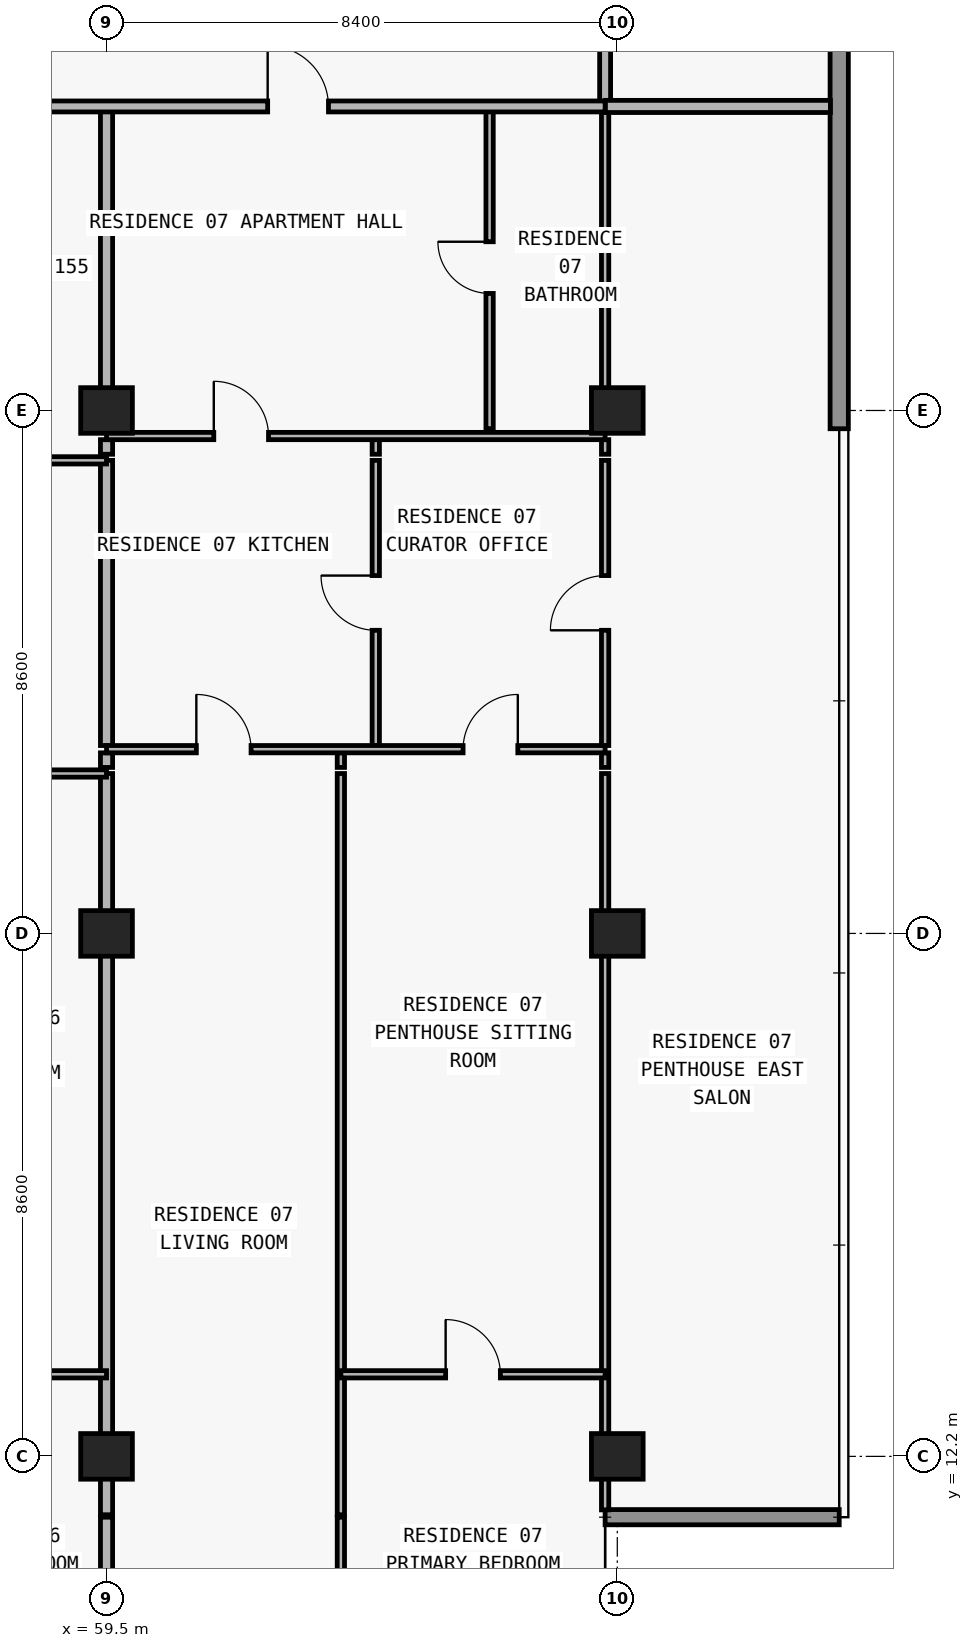
"""IFC4 building model, lengths in metres.
Left out: names, types, materials, properties, quantities, classifications, styles, units other than length and angle.
Written with IfcOpenShell. Run it as: python <this file> out.ifc"""

import sys

from ifc_helpers import new_model, si_unit, direction, frame, frame_2d, origin, origin_2d, place, context, subcontext, project, spatial, rectangle, extrude, element, fill, save


model = new_model("IFC4")
c1 = context("Model", 3, precision=1e-05, world=origin(), true_north=direction((0.0, 1.0)))
c2 = subcontext(c1, "Body", "Model", "MODEL_VIEW")
j1 = project(units=[si_unit("LENGTHUNIT", "METRE"), si_unit("PLANEANGLEUNIT", "RADIAN")], contexts=[c1])
p1 = place(None, origin())
s1 = spatial("IfcSite", under=j1, at=p1, CompositionType="ELEMENT")
p2 = place(p1, origin())
s2 = spatial("IfcBuilding", under=s1, at=p2, CompositionType="ELEMENT")
p3 = place(p2, frame((0.0, 0.0, 218.1)))
s3 = spatial("IfcBuildingStorey", under=s2, at=p3, CompositionType="ELEMENT", Elevation=218.1)
for number, where, z_axis, x_axis in (
    (1, (59.5, 12.2, 0.0), (0.0, 0.0, 1.0), (1.0, 0.0, 0.0)),
    (2, (67.9, 12.2, 0.0), (0.0, 0.0, 1.0), (1.0, 0.0, 0.0)),
    (3, (59.5, 20.8, 0.0), (0.0, 0.0, 1.0), (1.0, 0.0, 0.0)),
    (4, (67.9, 20.8, 0.0), (0.0, 0.0, 1.0), (1.0, 0.0, 0.0)),
    (5, (59.5, 29.4, 0.0), (0.0, 0.0, 1.0), (1.0, 0.0, 0.0)),
    (6, (67.9, 29.4, 0.0), (0.0, 0.0, 1.0), (1.0, 0.0, 0.0)),
):
    element("IfcColumn", number, at=place(p3, frame(where, z_axis=z_axis, x_axis=x_axis)), inside=s3, PredefinedType="COLUMN", context=c2, shape_type="SweptSolid", body=[
        extrude(rectangle(XDim=0.85, YDim=0.75, at=origin_2d()), origin(), (0.0, 0.0, 1.0), 3.0),
    ])
p4 = place(p3, frame((67.7, 11.2, 0.0), z_axis=(0.0, 0.0, 1.0), x_axis=(1.0, 0.0, 0.0)))
e7 = element("IfcWall", 7, at=p4, inside=s3, PredefinedType="ELEMENTEDWALL", context=c2, shape_type="SweptSolid", body=[
    extrude(rectangle(XDim=3.85, YDim=0.25, at=frame_2d((1.925, 0.0))), origin(), (0.0, 0.0, 1.0), 3.0),
])
p5 = place(p3, frame((71.55, 47.0, 0.0), z_axis=(0.0, 0.0, 1.0), x_axis=(0.0, -1.0, 0.0)))
e8 = element("IfcWall", 8, at=p5, inside=s3, PredefinedType="STANDARD", context=c2, shape_type="SweptSolid", body=[
    extrude(rectangle(XDim=17.9, YDim=0.3, at=frame_2d((8.95, 0.0))), origin(), (0.0, 0.0, 1.0), 3.0),
])
p6 = place(p3, frame((59.5, 7.895, 0.0), z_axis=(0.0, 0.0, 1.0), x_axis=(0.0, 1.0, 0.0)))
e9 = element("IfcWall", 9, at=p6, inside=s3, PredefinedType="PARTITIONING", context=c2, shape_type="SweptSolid", body=[
    extrude(rectangle(XDim=3.305, YDim=0.2, at=frame_2d((1.652, 0.0))), origin(), (0.0, 0.0, 1.0), 3.0),
])
p7 = place(p3, frame((59.5, 11.24, 0.0), z_axis=(0.0, 0.0, 1.0), x_axis=(0.0, 1.0, 0.0)))
e10 = element("IfcWall", 10, at=p7, inside=s3, PredefinedType="PARTITIONING", context=c2, shape_type="SweptSolid", body=[
    extrude(rectangle(XDim=12.19, YDim=0.2, at=frame_2d((6.095, 0.0))), origin(), (0.0, 0.0, 1.0), 2.213),
])
p8 = place(p3, frame((59.5, 23.53, 0.0), z_axis=(0.0, 0.0, 1.0), x_axis=(0.0, 1.0, 0.0)))
e11 = element("IfcWall", 11, at=p8, inside=s3, PredefinedType="PARTITIONING", context=c2, shape_type="SweptSolid", body=[
    extrude(rectangle(XDim=0.24, YDim=0.2, at=frame_2d((0.12, 0.0))), origin(), (0.0, 0.0, 1.0), 2.213),
])
p9 = place(p3, frame((59.5, 23.89, 0.0), z_axis=(0.0, 0.0, 1.0), x_axis=(0.0, 1.0, 0.0)))
e12 = element("IfcWall", 12, at=p9, inside=s3, PredefinedType="PARTITIONING", context=c2, shape_type="SweptSolid", body=[
    extrude(rectangle(XDim=4.69, YDim=0.2, at=frame_2d((2.345, 0.0))), origin(), (0.0, 0.0, 1.0), 2.213),
])
p10 = place(p3, frame((59.5, 28.68, 0.0), z_axis=(0.0, 0.0, 1.0), x_axis=(0.0, 1.0, 0.0)))
e13 = element("IfcWall", 13, at=p10, inside=s3, PredefinedType="PARTITIONING", context=c2, shape_type="SweptSolid", body=[
    extrude(rectangle(XDim=0.24, YDim=0.2, at=frame_2d((0.12, 0.0))), origin(), (0.0, 0.0, 1.0), 2.213),
])
p11 = place(p3, frame((59.5, 29.1, 0.0), z_axis=(0.0, 0.0, 1.0), x_axis=(0.0, 1.0, 0.0)))
e14 = element("IfcWall", 14, at=p11, inside=s3, PredefinedType="PARTITIONING", context=c2, shape_type="SweptSolid", body=[
    extrude(rectangle(XDim=5.3, YDim=0.2, at=frame_2d((2.65, 0.0))), origin(), (0.0, 0.0, 1.0), 2.213),
])
p12 = place(p3, frame((63.354, 7.895, 0.0), z_axis=(0.0, 0.0, 1.0), x_axis=(0.0, 1.0, 0.0)))
e15 = element("IfcWall", 15, at=p12, inside=s3, PredefinedType="PARTITIONING", context=c2, shape_type="SweptSolid", body=[
    extrude(rectangle(XDim=3.305, YDim=0.12, at=frame_2d((1.652, 0.0))), origin(), (0.0, 0.0, 1.0), 3.0),
])
p13 = place(p3, frame((63.354, 11.24, 0.0), z_axis=(0.0, 0.0, 1.0), x_axis=(0.0, 1.0, 0.0)))
e16 = element("IfcWall", 16, at=p13, inside=s3, PredefinedType="PARTITIONING", context=c2, shape_type="SweptSolid", body=[
    extrude(rectangle(XDim=12.19, YDim=0.12, at=frame_2d((6.095, 0.0))), origin(), (0.0, 0.0, 1.0), 3.0),
])
p14 = place(p3, frame((63.354, 23.53, 0.0), z_axis=(0.0, 0.0, 1.0), x_axis=(0.0, 1.0, 0.0)))
e17 = element("IfcWall", 17, at=p14, inside=s3, PredefinedType="PARTITIONING", context=c2, shape_type="SweptSolid", body=[
    extrude(rectangle(XDim=0.24, YDim=0.12, at=frame_2d((0.12, 0.0))), origin(), (0.0, 0.0, 1.0), 3.0),
])
p15 = place(p3, frame((63.928, 23.89, 0.0), z_axis=(0.0, 0.0, 1.0), x_axis=(0.0, 1.0, 0.0)))
e18 = element("IfcWall", 18, at=p15, inside=s3, PredefinedType="PARTITIONING", context=c2, shape_type="SweptSolid", body=[
    extrude(rectangle(XDim=4.69, YDim=0.12, at=frame_2d((2.345, 0.0))), origin(), (0.0, 0.0, 1.0), 2.449),
])
p16 = place(p15, frame((1.895, 0.0, 0.0)))
e19 = element("IfcOpeningElement", 19, at=p16, cuts=e18, PredefinedType="OPENING", context=c2, shape_type="SweptSolid", body=[
    extrude(rectangle(XDim=0.9, YDim=2.15, at=frame_2d((0.45, 1.075))), frame((0.0, 0.07, 0.0), z_axis=(0.0, -1.0, 0.0), x_axis=(1.0, 0.0, 0.0)), (0.0, 0.0, 1.0), 0.14),
])
p17 = place(p3, frame((63.928, 28.68, 0.0), z_axis=(0.0, 0.0, 1.0), x_axis=(0.0, 1.0, 0.0)))
e20 = element("IfcWall", 20, at=p17, inside=s3, PredefinedType="PARTITIONING", context=c2, shape_type="SweptSolid", body=[
    extrude(rectangle(XDim=0.24, YDim=0.12, at=frame_2d((0.12, 0.0))), origin(), (0.0, 0.0, 1.0), 2.449),
])
p18 = place(p3, frame((65.8, 29.1, 0.0), z_axis=(0.0, 0.0, 1.0), x_axis=(0.0, 1.0, 0.0)))
e21 = element("IfcWall", 21, at=p18, inside=s3, PredefinedType="PARTITIONING", context=c2, shape_type="SweptSolid", body=[
    extrude(rectangle(XDim=5.3, YDim=0.12, at=frame_2d((2.65, 0.0))), origin(), (0.0, 0.0, 1.0), 2.675),
])
p19 = place(p18, frame((2.225, 0.0, 0.0)))
e22 = element("IfcOpeningElement", 22, at=p19, cuts=e21, PredefinedType="OPENING", context=c2, shape_type="SweptSolid", body=[
    extrude(rectangle(XDim=0.85, YDim=2.1, at=frame_2d((0.425, 1.05))), frame((0.0, 0.07, 0.0), z_axis=(0.0, -1.0, 0.0), x_axis=(1.0, 0.0, 0.0)), (0.0, 0.0, 1.0), 0.14),
])
p20 = place(p3, frame((67.7, 11.32, 0.0), z_axis=(0.0, 0.0, 1.0), x_axis=(0.0, 1.0, 0.0)))
e23 = element("IfcWall", 23, at=p20, inside=s3, PredefinedType="PARTITIONING", context=c2, shape_type="SweptSolid", body=[
    extrude(rectangle(XDim=12.11, YDim=0.12, at=frame_2d((6.055, 0.0))), origin(), (0.0, 0.0, 1.0), 2.213),
])
p21 = place(p3, frame((67.7, 23.53, 0.0), z_axis=(0.0, 0.0, 1.0), x_axis=(0.0, 1.0, 0.0)))
e24 = element("IfcWall", 24, at=p21, inside=s3, PredefinedType="PARTITIONING", context=c2, shape_type="SweptSolid", body=[
    extrude(rectangle(XDim=0.24, YDim=0.12, at=frame_2d((0.12, 0.0))), origin(), (0.0, 0.0, 1.0), 2.213),
])
p22 = place(p3, frame((67.7, 23.89, 0.0), z_axis=(0.0, 0.0, 1.0), x_axis=(0.0, 1.0, 0.0)))
e25 = element("IfcWall", 25, at=p22, inside=s3, PredefinedType="PARTITIONING", context=c2, shape_type="SweptSolid", body=[
    extrude(rectangle(XDim=4.69, YDim=0.12, at=frame_2d((2.345, 0.0))), origin(), (0.0, 0.0, 1.0), 2.213),
])
p23 = place(p22, frame((1.895, 0.0, 0.0)))
e26 = element("IfcOpeningElement", 26, at=p23, cuts=e25, PredefinedType="OPENING", context=c2, shape_type="SweptSolid", body=[
    extrude(rectangle(XDim=0.9, YDim=2.15, at=frame_2d((0.45, 1.075))), frame((0.0, 0.07, 0.0), z_axis=(0.0, -1.0, 0.0), x_axis=(1.0, 0.0, 0.0)), (0.0, 0.0, 1.0), 0.14),
])
p24 = place(p3, frame((67.7, 28.68, 0.0), z_axis=(0.0, 0.0, 1.0), x_axis=(0.0, 1.0, 0.0)))
e27 = element("IfcWall", 27, at=p24, inside=s3, PredefinedType="PARTITIONING", context=c2, shape_type="SweptSolid", body=[
    extrude(rectangle(XDim=0.24, YDim=0.12, at=frame_2d((0.12, 0.0))), origin(), (0.0, 0.0, 1.0), 2.213),
])
p25 = place(p3, frame((67.7, 29.1, 0.0), z_axis=(0.0, 0.0, 1.0), x_axis=(0.0, 1.0, 0.0)))
e28 = element("IfcWall", 28, at=p25, inside=s3, PredefinedType="PARTITIONING", context=c2, shape_type="SweptSolid", body=[
    extrude(rectangle(XDim=5.3, YDim=0.12, at=frame_2d((2.65, 0.0))), origin(), (0.0, 0.0, 1.0), 2.213),
])
p26 = place(p3, frame((67.7, 34.405, 0.0), z_axis=(0.0, 0.0, 1.0), x_axis=(0.0, 1.0, 0.0)))
e29 = element("IfcWall", 29, at=p26, inside=s3, PredefinedType="PARTITIONING", context=c2, shape_type="SweptSolid", body=[
    extrude(rectangle(XDim=2.595, YDim=0.18, at=frame_2d((1.297, 0.0))), origin(), (0.0, 0.0, 1.0), 2.213),
])
p27 = place(p3, frame((55.72, 13.55, 0.0), z_axis=(0.0, 0.0, 1.0), x_axis=(1.0, 0.0, 0.0)))
e30 = element("IfcWall", 30, at=p27, inside=s3, PredefinedType="PARTITIONING", context=c2, shape_type="SweptSolid", body=[
    extrude(rectangle(XDim=3.78, YDim=0.12, at=frame_2d((1.89, 0.0))), origin(), (0.0, 0.0, 1.0), 3.0),
])
p28 = place(p27, frame((1.44, 0.0, 0.0)))
e31 = element("IfcOpeningElement", 31, at=p28, cuts=e30, PredefinedType="OPENING", context=c2, shape_type="SweptSolid", body=[
    extrude(rectangle(XDim=0.9, YDim=2.15, at=frame_2d((0.45, 1.075))), frame((0.0, 0.07, 0.0), z_axis=(0.0, -1.0, 0.0), x_axis=(1.0, 0.0, 0.0)), (0.0, 0.0, 1.0), 0.14),
])
p29 = place(p3, frame((63.354, 13.55, 0.0), z_axis=(0.0, 0.0, 1.0), x_axis=(1.0, 0.0, 0.0)))
e32 = element("IfcWall", 32, at=p29, inside=s3, PredefinedType="PARTITIONING", context=c2, shape_type="SweptSolid", body=[
    extrude(rectangle(XDim=4.346, YDim=0.12, at=frame_2d((2.173, 0.0))), origin(), (0.0, 0.0, 1.0), 3.0),
])
p30 = place(p29, frame((1.723, 0.0, 0.0)))
e33 = element("IfcOpeningElement", 33, at=p30, cuts=e32, PredefinedType="OPENING", context=c2, shape_type="SweptSolid", body=[
    extrude(rectangle(XDim=0.9, YDim=2.15, at=frame_2d((0.45, 1.075))), frame((0.0, 0.07, 0.0), z_axis=(0.0, -1.0, 0.0), x_axis=(1.0, 0.0, 0.0)), (0.0, 0.0, 1.0), 0.14),
])
p31 = place(p3, frame((51.32, 23.43, 0.0), z_axis=(0.0, 0.0, 1.0), x_axis=(1.0, 0.0, 0.0)))
e34 = element("IfcWall", 34, at=p31, inside=s3, PredefinedType="PARTITIONING", context=c2, shape_type="SweptSolid", body=[
    extrude(rectangle(XDim=8.18, YDim=0.12, at=frame_2d((4.09, 0.0))), origin(), (0.0, 0.0, 1.0), 3.0),
])
p32 = place(p31, frame((1.583, 0.0, 0.0)))
e35 = element("IfcOpeningElement", 35, at=p32, cuts=e34, PredefinedType="OPENING", context=c2, shape_type="SweptSolid", body=[
    extrude(rectangle(XDim=0.9, YDim=2.15, at=frame_2d((0.45, 1.075))), frame((0.0, 0.07, 0.0), z_axis=(0.0, -1.0, 0.0), x_axis=(1.0, 0.0, 0.0)), (0.0, 0.0, 1.0), 0.14),
])
p33 = place(p31, frame((5.84, 0.0, 0.0)))
e36 = element("IfcOpeningElement", 36, at=p33, cuts=e34, PredefinedType="OPENING", context=c2, shape_type="SweptSolid", body=[
    extrude(rectangle(XDim=0.9, YDim=2.15, at=frame_2d((0.45, 1.075))), frame((0.0, 0.07, 0.0), z_axis=(0.0, -1.0, 0.0), x_axis=(1.0, 0.0, 0.0)), (0.0, 0.0, 1.0), 0.14),
])
p34 = place(p3, frame((59.5, 23.83, 0.0), z_axis=(0.0, 0.0, 1.0), x_axis=(1.0, 0.0, 0.0)))
e37 = element("IfcWall", 37, at=p34, inside=s3, PredefinedType="PARTITIONING", context=c2, shape_type="SweptSolid", body=[
    extrude(rectangle(XDim=8.2, YDim=0.12, at=frame_2d((4.1, 0.0))), origin(), (0.0, 0.0, 1.0), 3.0),
])
p35 = place(p34, frame((1.477, 0.0, 0.0)))
e38 = element("IfcOpeningElement", 38, at=p35, cuts=e37, PredefinedType="OPENING", context=c2, shape_type="SweptSolid", body=[
    extrude(rectangle(XDim=0.9, YDim=2.15, at=frame_2d((0.45, 1.075))), frame((0.0, 0.07, 0.0), z_axis=(0.0, -1.0, 0.0), x_axis=(1.0, 0.0, 0.0)), (0.0, 0.0, 1.0), 0.14),
])
p36 = place(p34, frame((5.864, 0.0, 0.0)))
e39 = element("IfcOpeningElement", 39, at=p36, cuts=e37, PredefinedType="OPENING", context=c2, shape_type="SweptSolid", body=[
    extrude(rectangle(XDim=0.9, YDim=2.15, at=frame_2d((0.45, 1.075))), frame((0.0, 0.07, 0.0), z_axis=(0.0, -1.0, 0.0), x_axis=(1.0, 0.0, 0.0)), (0.0, 0.0, 1.0), 0.14),
])
p37 = place(p3, frame((51.32, 28.58, 0.0), z_axis=(0.0, 0.0, 1.0), x_axis=(1.0, 0.0, 0.0)))
e40 = element("IfcWall", 40, at=p37, inside=s3, PredefinedType="PARTITIONING", context=c2, shape_type="SweptSolid", body=[
    extrude(rectangle(XDim=8.18, YDim=0.12, at=frame_2d((4.09, 0.0))), origin(), (0.0, 0.0, 1.0), 3.0),
])
p38 = place(p37, frame((1.583, 0.0, 0.0)))
e41 = element("IfcOpeningElement", 41, at=p38, cuts=e40, PredefinedType="OPENING", context=c2, shape_type="SweptSolid", body=[
    extrude(rectangle(XDim=0.9, YDim=2.15, at=frame_2d((0.45, 1.075))), frame((0.0, 0.07, 0.0), z_axis=(0.0, -1.0, 0.0), x_axis=(1.0, 0.0, 0.0)), (0.0, 0.0, 1.0), 0.14),
])
p39 = place(p3, frame((59.5, 28.98, 0.0), z_axis=(0.0, 0.0, 1.0), x_axis=(1.0, 0.0, 0.0)))
e42 = element("IfcWall", 42, at=p39, inside=s3, PredefinedType="PARTITIONING", context=c2, shape_type="SweptSolid", body=[
    extrude(rectangle(XDim=8.2, YDim=0.12, at=frame_2d((4.1, 0.0))), origin(), (0.0, 0.0, 1.0), 3.0),
])
p40 = place(p39, frame((1.764, 0.0, 0.0)))
e43 = element("IfcOpeningElement", 43, at=p40, cuts=e42, PredefinedType="OPENING", context=c2, shape_type="SweptSolid", body=[
    extrude(rectangle(XDim=0.9, YDim=2.15, at=frame_2d((0.45, 1.075))), frame((0.0, 0.07, 0.0), z_axis=(0.0, -1.0, 0.0), x_axis=(1.0, 0.0, 0.0)), (0.0, 0.0, 1.0), 0.14),
])
p41 = place(p3, frame((39.28, 34.4, 0.0), z_axis=(0.0, 0.0, 1.0), x_axis=(1.0, 0.0, 0.0)))
e44 = element("IfcWall", 44, at=p41, inside=s3, PredefinedType="PARTITIONING", context=c2, shape_type="SweptSolid", body=[
    extrude(rectangle(XDim=28.42, YDim=0.18, at=frame_2d((14.21, 0.0))), origin(), (0.0, 0.0, 1.0), 3.0),
])
p42 = place(p41, frame((6.18, 0.0, 0.0)))
e45 = element("IfcOpeningElement", 45, at=p42, cuts=e44, PredefinedType="OPENING", context=c2, shape_type="SweptSolid", body=[
    extrude(rectangle(XDim=1.0, YDim=2.2, at=frame_2d((0.5, 1.1))), frame((0.0, 0.1, 0.0), z_axis=(0.0, -1.0, 0.0), x_axis=(1.0, 0.0, 0.0)), (0.0, 0.0, 1.0), 0.2),
])
p43 = place(p41, frame((14.695, 0.0, 0.0)))
e46 = element("IfcOpeningElement", 46, at=p43, cuts=e44, PredefinedType="OPENING", context=c2, shape_type="SweptSolid", body=[
    extrude(rectangle(XDim=1.0, YDim=2.2, at=frame_2d((0.5, 1.1))), frame((0.0, 0.1, 0.0), z_axis=(0.0, -1.0, 0.0), x_axis=(1.0, 0.0, 0.0)), (0.0, 0.0, 1.0), 0.2),
])
p44 = place(p41, frame((22.87, 0.0, 0.0)))
e47 = element("IfcOpeningElement", 47, at=p44, cuts=e44, PredefinedType="OPENING", context=c2, shape_type="SweptSolid", body=[
    extrude(rectangle(XDim=1.0, YDim=2.2, at=frame_2d((0.5, 1.1))), frame((0.0, 0.1, 0.0), z_axis=(0.0, -1.0, 0.0), x_axis=(1.0, 0.0, 0.0)), (0.0, 0.0, 1.0), 0.2),
])
p45 = place(p3, frame((67.705, 34.4, 0.0), z_axis=(0.0, 0.0, 1.0), x_axis=(1.0, 0.0, 0.0)))
e48 = element("IfcWall", 48, at=p45, inside=s3, PredefinedType="PARTITIONING", context=c2, shape_type="SweptSolid", body=[
    extrude(rectangle(XDim=3.7, YDim=0.2, at=frame_2d((1.85, 0.0))), origin(), (0.0, 0.0, 1.0), 3.0),
])
p46 = place(p44, origin())
e49 = element("IfcDoor", 49, at=p46, inside=s3, OperationType="SINGLE_SWING_LEFT", PredefinedType="DOOR", context=c2, shape_type="SweptSolid", body=[
    extrude(rectangle(XDim=1.0, YDim=2.2, at=frame_2d((0.5, 1.1))), frame((0.0, 0.025, 0.0), z_axis=(0.0, -1.0, 0.0), x_axis=(1.0, 0.0, 0.0)), (0.0, 0.0, 1.0), 0.05),
])
fill(e47, e49)
p47 = place(p19, origin())
e50 = element("IfcDoor", 50, at=p47, inside=s3, OperationType="SINGLE_SWING_RIGHT", PredefinedType="DOOR", context=c2, shape_type="SweptSolid", body=[
    extrude(rectangle(XDim=0.85, YDim=2.1, at=frame_2d((0.425, 1.05))), frame((0.0, 0.025, 0.0), z_axis=(0.0, -1.0, 0.0), x_axis=(1.0, 0.0, 0.0)), (0.0, 0.0, 1.0), 0.05),
])
fill(e22, e50)
p48 = place(p40, origin())
e51 = element("IfcDoor", 51, at=p48, inside=s3, OperationType="SINGLE_SWING_LEFT", PredefinedType="DOOR", context=c2, shape_type="SweptSolid", body=[
    extrude(rectangle(XDim=0.9, YDim=2.15, at=frame_2d((0.45, 1.075))), frame((0.0, 0.025, 0.0), z_axis=(0.0, -1.0, 0.0), x_axis=(1.0, 0.0, 0.0)), (0.0, 0.0, 1.0), 0.05),
])
fill(e43, e51)
p49 = place(p16, origin())
e52 = element("IfcDoor", 52, at=p49, inside=s3, OperationType="SINGLE_SWING_RIGHT", PredefinedType="DOOR", context=c2, shape_type="SweptSolid", body=[
    extrude(rectangle(XDim=0.9, YDim=2.15, at=frame_2d((0.45, 1.075))), frame((0.0, 0.025, 0.0), z_axis=(0.0, -1.0, 0.0), x_axis=(1.0, 0.0, 0.0)), (0.0, 0.0, 1.0), 0.05),
])
fill(e19, e52)
p50 = place(p35, origin())
e53 = element("IfcDoor", 53, at=p50, inside=s3, OperationType="SINGLE_SWING_LEFT", PredefinedType="DOOR", context=c2, shape_type="SweptSolid", body=[
    extrude(rectangle(XDim=0.9, YDim=2.15, at=frame_2d((0.45, 1.075))), frame((0.0, 0.025, 0.0), z_axis=(0.0, -1.0, 0.0), x_axis=(1.0, 0.0, 0.0)), (0.0, 0.0, 1.0), 0.05),
])
fill(e38, e53)
p51 = place(p36, origin())
e54 = element("IfcDoor", 54, at=p51, inside=s3, OperationType="SINGLE_SWING_RIGHT", PredefinedType="DOOR", context=c2, shape_type="SweptSolid", body=[
    extrude(rectangle(XDim=0.9, YDim=2.15, at=frame_2d((0.45, 1.075))), frame((0.0, 0.025, 0.0), z_axis=(0.0, -1.0, 0.0), x_axis=(1.0, 0.0, 0.0)), (0.0, 0.0, 1.0), 0.05),
])
fill(e39, e54)
p52 = place(p30, origin())
e55 = element("IfcDoor", 55, at=p52, inside=s3, OperationType="SINGLE_SWING_LEFT", PredefinedType="DOOR", context=c2, shape_type="SweptSolid", body=[
    extrude(rectangle(XDim=0.9, YDim=2.15, at=frame_2d((0.45, 1.075))), frame((0.0, 0.025, 0.0), z_axis=(0.0, -1.0, 0.0), x_axis=(1.0, 0.0, 0.0)), (0.0, 0.0, 1.0), 0.05),
])
fill(e33, e55)
p53 = place(p23, origin())
e56 = element("IfcDoor", 56, at=p53, inside=s3, OperationType="SINGLE_SWING_LEFT", PredefinedType="DOOR", context=c2, shape_type="SweptSolid", body=[
    extrude(rectangle(XDim=0.9, YDim=2.15, at=frame_2d((0.45, 1.075))), frame((0.0, 0.025, 0.0), z_axis=(0.0, -1.0, 0.0), x_axis=(1.0, 0.0, 0.0)), (0.0, 0.0, 1.0), 0.05),
])
fill(e26, e56)
save(model, sys.argv[1])
